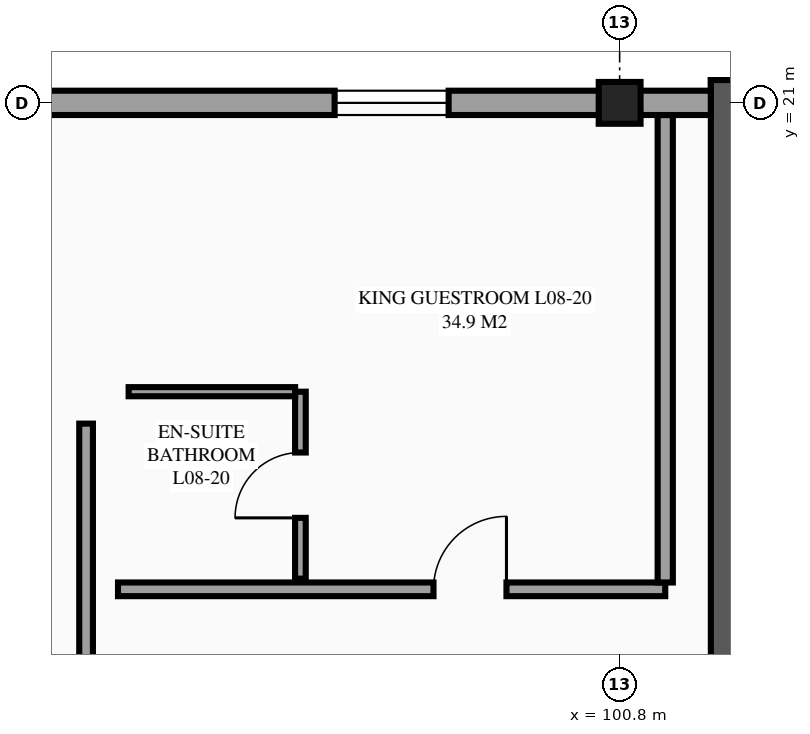
"""IFC4 building model, lengths in metres.
Left out: names, types, materials, properties, quantities, classifications, styles, units other than length and angle.
Written with IfcOpenShell. Run it as: python <this file> out.ifc"""

import sys

from ifc_helpers import new_model, si_unit, direction, frame, frame_2d, origin, origin_2d, place, context, subcontext, project, spatial, rectangle, extrude, element, fill, save


model = new_model("IFC4")
c1 = context("Model", 3, precision=1e-05, world=origin(), true_north=direction((0.0, 1.0)))
c2 = subcontext(c1, "Body", "Model", "MODEL_VIEW")
j1 = project(units=[si_unit("LENGTHUNIT", "METRE"), si_unit("PLANEANGLEUNIT", "RADIAN")], contexts=[c1])
p1 = place(None, origin())
s1 = spatial("IfcSite", under=j1, at=p1, CompositionType="ELEMENT")
p2 = place(p1, origin())
s2 = spatial("IfcBuilding", under=s1, at=p2, CompositionType="ELEMENT")
p3 = place(p2, frame((0.0, 0.0, 32.7)))
s3 = spatial("IfcBuildingStorey", under=s2, at=p3, CompositionType="ELEMENT", Elevation=32.7)
p4 = place(p3, frame((100.8, 21.0, 0.0), z_axis=(0.0, 0.0, 1.0), x_axis=(1.0, 0.0, 0.0)))
e1 = element("IfcColumn", 1, at=p4, inside=s3, PredefinedType="COLUMN", context=c2, shape_type="SweptSolid", body=[
    extrude(rectangle(XDim=0.55, YDim=0.55, at=origin_2d()), origin(), (0.0, 0.0, 1.0), 3.6),
])
p5 = place(p3, frame((107.2, 21.15, 0.0), z_axis=(0.0, 0.0, 1.0), x_axis=(-1.0, 0.0, 0.0)))
e2 = element("IfcWall", 2, at=p5, inside=s3, PredefinedType="SHEAR", context=c2, shape_type="SweptSolid", body=[
    extrude(rectangle(XDim=5.2, YDim=0.3, at=frame_2d((2.6, 0.0))), origin(), (0.0, 0.0, 1.0), 3.6),
])
p6 = place(p3, frame((102.15, 21.3, 0.0), z_axis=(0.0, 0.0, 1.0), x_axis=(0.0, -1.0, 0.0)))
e3 = element("IfcWall", 3, at=p6, inside=s3, PredefinedType="SHEAR", context=c2, shape_type="SweptSolid", body=[
    extrude(rectangle(XDim=8.84, YDim=0.3, at=frame_2d((4.42, 0.0))), origin(), (0.0, 0.0, 1.0), 3.6),
])
p7 = place(p3, frame((94.2, 14.6, 0.0), z_axis=(0.0, 0.0, 1.0), x_axis=(1.0, 0.0, 0.0)))
e4 = element("IfcWall", 4, at=p7, inside=s3, PredefinedType="PARTITIONING", context=c2, shape_type="SweptSolid", body=[
    extrude(rectangle(XDim=7.2, YDim=0.18, at=frame_2d((3.6, 0.0))), origin(), (0.0, 0.0, 1.0), 3.375),
])
p8 = place(p7, frame((4.151, 0.0, 0.0)))
e5 = element("IfcOpeningElement", 5, at=p8, cuts=e4, PredefinedType="OPENING", context=c2, shape_type="SweptSolid", body=[
    extrude(rectangle(XDim=0.96, YDim=2.15, at=frame_2d((0.48, 1.075))), frame((0.0, 0.1, 0.0), z_axis=(0.0, -1.0, 0.0), x_axis=(1.0, 0.0, 0.0)), (0.0, 0.0, 1.0), 0.2),
])
p9 = place(p3, frame((101.4, 14.69, 0.0), z_axis=(0.0, 0.0, 1.0), x_axis=(0.0, 1.0, 0.0)))
e6 = element("IfcWall", 6, at=p9, inside=s3, PredefinedType="PARTITIONING", context=c2, shape_type="SweptSolid", body=[
    extrude(rectangle(XDim=6.15, YDim=0.2, at=frame_2d((3.075, 0.0))), origin(), (0.0, 0.0, 1.0), 3.375),
])
p10 = place(p3, frame((96.6, 14.74, 0.0), z_axis=(0.0, 0.0, 1.0), x_axis=(0.0, 1.0, 0.0)))
e7 = element("IfcWall", 7, at=p10, inside=s3, PredefinedType="PARTITIONING", context=c2, shape_type="SweptSolid", body=[
    extrude(rectangle(XDim=2.46, YDim=0.14, at=frame_2d((1.23, 0.0))), origin(), (0.0, 0.0, 1.0), 3.375),
])
p11 = place(p10, frame((0.8, 0.0, 0.0)))
e8 = element("IfcOpeningElement", 8, at=p11, cuts=e7, PredefinedType="OPENING", context=c2, shape_type="SweptSolid", body=[
    extrude(rectangle(XDim=0.86, YDim=2.1, at=frame_2d((0.43, 1.05))), frame((0.0, 0.08, 0.0), z_axis=(0.0, -1.0, 0.0), x_axis=(1.0, 0.0, 0.0)), (0.0, 0.0, 1.0), 0.16),
])
p12 = place(p3, frame((94.34, 17.2, 0.0), z_axis=(0.0, 0.0, 1.0), x_axis=(1.0, 0.0, 0.0)))
e9 = element("IfcWall", 9, at=p12, inside=s3, PredefinedType="PARTITIONING", context=c2, shape_type="SweptSolid", body=[
    extrude(rectangle(XDim=2.19, YDim=0.12, at=frame_2d((1.095, 0.0))), origin(), (0.0, 0.0, 1.0), 3.375),
])
p13 = place(p3, frame((93.78, 12.91, 0.0), z_axis=(0.0, 0.0, 1.0), x_axis=(0.0, 1.0, 0.0)))
e10 = element("IfcWall", 10, at=p13, inside=s3, PredefinedType="PARTITIONING", context=c2, shape_type="SweptSolid", body=[
    extrude(rectangle(XDim=3.87, YDim=0.18, at=frame_2d((1.935, 0.0))), origin(), (0.0, 0.0, 1.0), 3.375),
])
p14 = place(p3, frame((102.0, 21.0, 0.0), z_axis=(0.0, 0.0, 1.0), x_axis=(-1.0, 0.0, 0.0)))
e11 = element("IfcWall", 11, at=p14, inside=s3, PredefinedType="STANDARD", context=c2, shape_type="SweptSolid", body=[
    extrude(rectangle(XDim=1.2, YDim=0.32, at=frame_2d((0.6, 0.0))), origin(), (0.0, 0.0, 1.0), 2.58),
])
p15 = place(p3, frame((100.8, 21.0, 0.0), z_axis=(0.0, 0.0, 1.0), x_axis=(-1.0, 0.0, 0.0)))
e12 = element("IfcWall", 12, at=p15, inside=s3, PredefinedType="STANDARD", context=c2, shape_type="SweptSolid", body=[
    extrude(rectangle(XDim=8.4, YDim=0.32, at=frame_2d((4.2, 0.0))), origin(), (0.0, 0.0, 1.0), 2.48),
])
p16 = place(p15, frame((2.25, 0.0, 0.85)))
e13 = element("IfcOpeningElement", 13, at=p16, cuts=e12, PredefinedType="OPENING", context=c2, shape_type="SweptSolid", body=[
    extrude(rectangle(XDim=1.5, YDim=1.5, at=frame_2d((0.75, 0.75))), frame((0.0, 0.17, 0.0), z_axis=(0.0, -1.0, 0.0), x_axis=(1.0, 0.0, 0.0)), (0.0, 0.0, 1.0), 0.34),
])
p17 = place(p16, origin())
e14 = element("IfcWindow", 14, at=p17, inside=s3, PartitioningType="SINGLE_PANEL", PredefinedType="WINDOW", context=c2, shape_type="SweptSolid", body=[
    extrude(rectangle(XDim=1.5, YDim=1.5, at=frame_2d((0.75, 0.75))), frame((0.0, 0.03, 0.0), z_axis=(0.0, -1.0, 0.0), x_axis=(1.0, 0.0, 0.0)), (0.0, 0.0, 1.0), 0.06),
])
fill(e13, e14)
p18 = place(p8, origin())
e15 = element("IfcDoor", 15, at=p18, inside=s3, OperationType="SINGLE_SWING_RIGHT", PredefinedType="DOOR", context=c2, shape_type="SweptSolid", body=[
    extrude(rectangle(XDim=0.96, YDim=2.15, at=frame_2d((0.48, 1.075))), frame((0.0, 0.025, 0.0), z_axis=(0.0, -1.0, 0.0), x_axis=(1.0, 0.0, 0.0)), (0.0, 0.0, 1.0), 0.05),
])
fill(e5, e15)
p19 = place(p11, origin())
e16 = element("IfcDoor", 16, at=p19, inside=s3, OperationType="SINGLE_SWING_LEFT", PredefinedType="DOOR", context=c2, shape_type="SweptSolid", body=[
    extrude(rectangle(XDim=0.86, YDim=2.1, at=frame_2d((0.43, 1.05))), frame((0.0, 0.025, 0.0), z_axis=(0.0, -1.0, 0.0), x_axis=(1.0, 0.0, 0.0)), (0.0, 0.0, 1.0), 0.05),
])
fill(e8, e16)
save(model, sys.argv[1])
